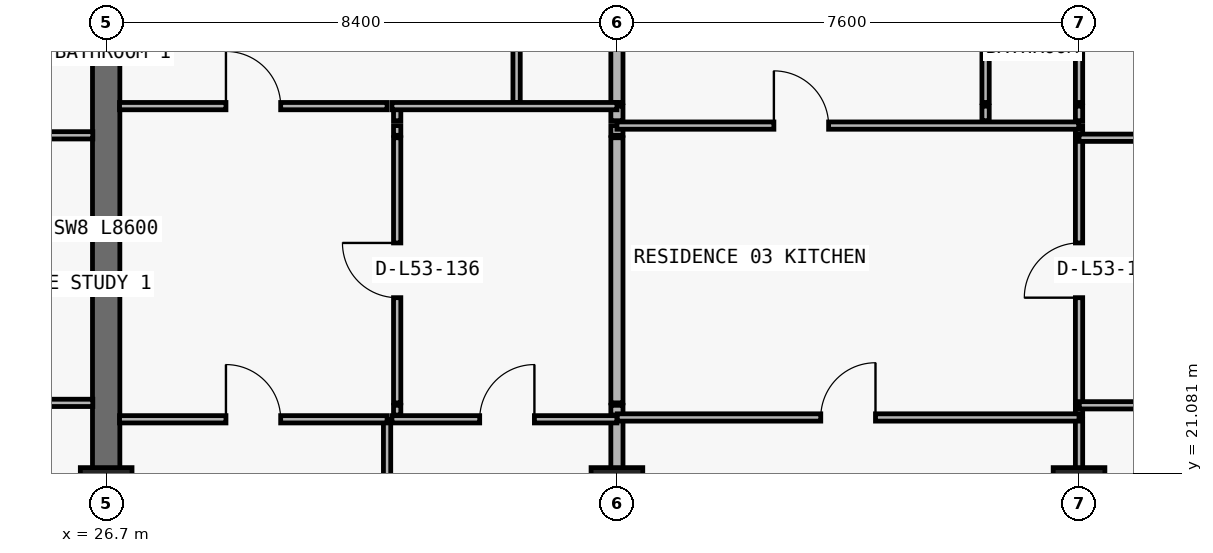
"""IFC4 building model, lengths in metres.
Left out: names, types, materials, properties, quantities, classifications, styles, units other than length and angle.
Written with IfcOpenShell. Run it as: python <this file> out.ifc"""

import sys

from ifc_helpers import new_model, si_unit, direction, frame, frame_2d, origin, origin_2d, place, context, subcontext, project, spatial, rectangle, extrude, element, fill, save


model = new_model("IFC4")
c1 = context("Model", 3, precision=1e-05, world=origin(), true_north=direction((0.0, 1.0)))
c2 = subcontext(c1, "Body", "Model", "MODEL_VIEW")
j1 = project(units=[si_unit("LENGTHUNIT", "METRE"), si_unit("PLANEANGLEUNIT", "RADIAN")], contexts=[c1])
p1 = place(None, origin())
s1 = spatial("IfcSite", under=j1, at=p1, CompositionType="ELEMENT")
p2 = place(p1, origin())
s2 = spatial("IfcBuilding", under=s1, at=p2, CompositionType="ELEMENT")
p3 = place(p2, frame((0.0, 0.0, 191.7)))
s3 = spatial("IfcBuildingStorey", under=s2, at=p3, CompositionType="ELEMENT", Elevation=191.7)
for number, where, z_axis, x_axis in (
    (1, (26.7, 20.8, 0.0), (0.0, 0.0, 1.0), (1.0, 0.0, 0.0)),
    (2, (35.1, 20.8, 0.0), (0.0, 0.0, 1.0), (1.0, 0.0, 0.0)),
    (3, (42.7, 20.8, 0.0), (0.0, 0.0, 1.0), (1.0, 0.0, 0.0)),
):
    element("IfcColumn", number, at=place(p3, frame(where, z_axis=z_axis, x_axis=x_axis)), inside=s3, PredefinedType="COLUMN", context=c2, shape_type="SweptSolid", body=[
        extrude(rectangle(XDim=0.85, YDim=0.75, at=origin_2d()), origin(), (0.0, 0.0, 1.0), 3.05),
    ])
p4 = place(p3, frame((26.7, 20.8, 0.0), z_axis=(0.0, 0.0, 1.0), x_axis=(0.0, 1.0, 0.0)))
e4 = element("IfcWall", 4, at=p4, inside=s3, PredefinedType="SHEAR", context=c2, shape_type="SweptSolid", body=[
    extrude(rectangle(XDim=8.6, YDim=0.45, at=frame_2d((4.3, 0.0))), origin(), (0.0, 0.0, 1.0), 3.05),
])
p5 = place(p3, frame((31.32, 11.24, 0.0), z_axis=(0.0, 0.0, 1.0), x_axis=(0.0, 1.0, 0.0)))
e5 = element("IfcWall", 5, at=p5, inside=s3, PredefinedType="PARTITIONING", context=c2, shape_type="SweptSolid", body=[
    extrude(rectangle(XDim=10.73, YDim=0.12, at=frame_2d((5.365, 0.0))), origin(), (0.0, 0.0, 1.0), 3.05),
])
p6 = place(p3, frame((31.486, 22.04, 0.0), z_axis=(0.0, 0.0, 1.0), x_axis=(0.0, 1.0, 0.0)))
e6 = element("IfcWall", 6, at=p6, inside=s3, PredefinedType="PARTITIONING", context=c2, shape_type="SweptSolid", body=[
    extrude(rectangle(XDim=0.16, YDim=0.12, at=frame_2d((0.08, 0.0))), origin(), (0.0, 0.0, 1.0), 3.05),
])
p7 = place(p3, frame((31.486, 22.24, 0.0), z_axis=(0.0, 0.0, 1.0), x_axis=(0.0, 1.0, 0.0)))
e7 = element("IfcWall", 7, at=p7, inside=s3, PredefinedType="PARTITIONING", context=c2, shape_type="SweptSolid", body=[
    extrude(rectangle(XDim=4.36, YDim=0.12, at=frame_2d((2.18, 0.0))), origin(), (0.0, 0.0, 1.0), 3.05),
])
p8 = place(p7, frame((1.73, 0.0, 0.0)))
e8 = element("IfcOpeningElement", 8, at=p8, cuts=e7, PredefinedType="OPENING", context=c2, shape_type="SweptSolid", body=[
    extrude(rectangle(XDim=0.9, YDim=2.15, at=frame_2d((0.45, 1.075))), frame((0.0, 0.07, 0.0), z_axis=(0.0, -1.0, 0.0), x_axis=(1.0, 0.0, 0.0)), (0.0, 0.0, 1.0), 0.14),
])
p9 = place(p3, frame((31.486, 26.64, 0.0), z_axis=(0.0, 0.0, 1.0), x_axis=(0.0, 1.0, 0.0)))
e9 = element("IfcWall", 9, at=p9, inside=s3, PredefinedType="PARTITIONING", context=c2, shape_type="SweptSolid", body=[
    extrude(rectangle(XDim=0.16, YDim=0.12, at=frame_2d((0.08, 0.0))), origin(), (0.0, 0.0, 1.0), 3.05),
])
p10 = place(p3, frame((31.486, 26.88, 0.0), z_axis=(0.0, 0.0, 1.0), x_axis=(0.0, 1.0, 0.0)))
e10 = element("IfcWall", 10, at=p10, inside=s3, PredefinedType="PARTITIONING", context=c2, shape_type="SweptSolid", body=[
    extrude(rectangle(XDim=0.24, YDim=0.12, at=frame_2d((0.12, 0.0))), origin(), (0.0, 0.0, 1.0), 3.05),
])
p11 = place(p3, frame((33.45, 27.18, 0.0), z_axis=(0.0, 0.0, 1.0), x_axis=(0.0, 1.0, 0.0)))
e11 = element("IfcWall", 11, at=p11, inside=s3, PredefinedType="PARTITIONING", context=c2, shape_type="SweptSolid", body=[
    extrude(rectangle(XDim=6.32, YDim=0.12, at=frame_2d((3.16, 0.0))), origin(), (0.0, 0.0, 1.0), 3.05),
])
p12 = place(p11, frame((3.035, 0.0, 0.0)))
e12 = element("IfcOpeningElement", 12, at=p12, cuts=e11, PredefinedType="OPENING", context=c2, shape_type="SweptSolid", body=[
    extrude(rectangle(XDim=0.85, YDim=2.1, at=frame_2d((0.425, 1.05))), frame((0.0, 0.07, 0.0), z_axis=(0.0, -1.0, 0.0), x_axis=(1.0, 0.0, 0.0)), (0.0, 0.0, 1.0), 0.14),
])
p13 = place(p3, frame((35.1, 11.24, 0.0), z_axis=(0.0, 0.0, 1.0), x_axis=(0.0, 1.0, 0.0)))
e13 = element("IfcWall", 13, at=p13, inside=s3, PredefinedType="PARTITIONING", context=c2, shape_type="SweptSolid", body=[
    extrude(rectangle(XDim=10.73, YDim=0.2, at=frame_2d((5.365, 0.0))), origin(), (0.0, 0.0, 1.0), 2.263),
])
p14 = place(p3, frame((35.1, 22.04, 0.0), z_axis=(0.0, 0.0, 1.0), x_axis=(0.0, 1.0, 0.0)))
e14 = element("IfcWall", 14, at=p14, inside=s3, PredefinedType="PARTITIONING", context=c2, shape_type="SweptSolid", body=[
    extrude(rectangle(XDim=0.16, YDim=0.2, at=frame_2d((0.08, 0.0))), origin(), (0.0, 0.0, 1.0), 2.263),
])
p15 = place(p3, frame((35.1, 22.24, 0.0), z_axis=(0.0, 0.0, 1.0), x_axis=(0.0, 1.0, 0.0)))
e15 = element("IfcWall", 15, at=p15, inside=s3, PredefinedType="PARTITIONING", context=c2, shape_type="SweptSolid", body=[
    extrude(rectangle(XDim=4.36, YDim=0.2, at=frame_2d((2.18, 0.0))), origin(), (0.0, 0.0, 1.0), 2.263),
])
p16 = place(p3, frame((35.1, 26.64, 0.0), z_axis=(0.0, 0.0, 1.0), x_axis=(0.0, 1.0, 0.0)))
e16 = element("IfcWall", 16, at=p16, inside=s3, PredefinedType="PARTITIONING", context=c2, shape_type="SweptSolid", body=[
    extrude(rectangle(XDim=0.16, YDim=0.2, at=frame_2d((0.08, 0.0))), origin(), (0.0, 0.0, 1.0), 2.263),
])
p17 = place(p3, frame((35.1, 26.88, 0.0), z_axis=(0.0, 0.0, 1.0), x_axis=(0.0, 1.0, 0.0)))
e17 = element("IfcWall", 17, at=p17, inside=s3, PredefinedType="PARTITIONING", context=c2, shape_type="SweptSolid", body=[
    extrude(rectangle(XDim=0.24, YDim=0.2, at=frame_2d((0.12, 0.0))), origin(), (0.0, 0.0, 1.0), 2.263),
])
p18 = place(p3, frame((35.1, 27.18, 0.0), z_axis=(0.0, 0.0, 1.0), x_axis=(0.0, 1.0, 0.0)))
e18 = element("IfcWall", 18, at=p18, inside=s3, PredefinedType="PARTITIONING", context=c2, shape_type="SweptSolid", body=[
    extrude(rectangle(XDim=6.32, YDim=0.2, at=frame_2d((3.16, 0.0))), origin(), (0.0, 0.0, 1.0), 2.263),
])
p19 = place(p3, frame((41.163, 26.88, 0.0), z_axis=(0.0, 0.0, 1.0), x_axis=(0.0, 1.0, 0.0)))
e19 = element("IfcWall", 19, at=p19, inside=s3, PredefinedType="PARTITIONING", context=c2, shape_type="SweptSolid", body=[
    extrude(rectangle(XDim=0.24, YDim=0.12, at=frame_2d((0.12, 0.0))), origin(), (0.0, 0.0, 1.0), 3.05),
])
p20 = place(p3, frame((41.163, 27.18, 0.0), z_axis=(0.0, 0.0, 1.0), x_axis=(0.0, 1.0, 0.0)))
e20 = element("IfcWall", 20, at=p20, inside=s3, PredefinedType="PARTITIONING", context=c2, shape_type="SweptSolid", body=[
    extrude(rectangle(XDim=6.32, YDim=0.12, at=frame_2d((3.16, 0.0))), origin(), (0.0, 0.0, 1.0), 3.05),
])
p21 = place(p20, frame((3.035, 0.0, 0.0)))
e21 = element("IfcOpeningElement", 21, at=p21, cuts=e20, PredefinedType="OPENING", context=c2, shape_type="SweptSolid", body=[
    extrude(rectangle(XDim=0.85, YDim=2.1, at=frame_2d((0.425, 1.05))), frame((0.0, 0.07, 0.0), z_axis=(0.0, -1.0, 0.0), x_axis=(1.0, 0.0, 0.0)), (0.0, 0.0, 1.0), 0.14),
])
p22 = place(p3, frame((42.7, 11.24, 0.0), z_axis=(0.0, 0.0, 1.0), x_axis=(0.0, 1.0, 0.0)))
e22 = element("IfcWall", 22, at=p22, inside=s3, PredefinedType="PARTITIONING", context=c2, shape_type="SweptSolid", body=[
    extrude(rectangle(XDim=10.73, YDim=0.12, at=frame_2d((5.365, 0.0))), origin(), (0.0, 0.0, 1.0), 2.263),
])
p23 = place(p3, frame((42.7, 22.04, 0.0), z_axis=(0.0, 0.0, 1.0), x_axis=(0.0, 1.0, 0.0)))
e23 = element("IfcWall", 23, at=p23, inside=s3, PredefinedType="PARTITIONING", context=c2, shape_type="SweptSolid", body=[
    extrude(rectangle(XDim=0.16, YDim=0.12, at=frame_2d((0.08, 0.0))), origin(), (0.0, 0.0, 1.0), 2.263),
])
p24 = place(p3, frame((42.7, 22.24, 0.0), z_axis=(0.0, 0.0, 1.0), x_axis=(0.0, 1.0, 0.0)))
e24 = element("IfcWall", 24, at=p24, inside=s3, PredefinedType="PARTITIONING", context=c2, shape_type="SweptSolid", body=[
    extrude(rectangle(XDim=4.36, YDim=0.12, at=frame_2d((2.18, 0.0))), origin(), (0.0, 0.0, 1.0), 2.263),
])
p25 = place(p24, frame((1.73, 0.0, 0.0)))
e25 = element("IfcOpeningElement", 25, at=p25, cuts=e24, PredefinedType="OPENING", context=c2, shape_type="SweptSolid", body=[
    extrude(rectangle(XDim=0.9, YDim=2.15, at=frame_2d((0.45, 1.075))), frame((0.0, 0.07, 0.0), z_axis=(0.0, -1.0, 0.0), x_axis=(1.0, 0.0, 0.0)), (0.0, 0.0, 1.0), 0.14),
])
p26 = place(p3, frame((42.7, 26.64, 0.0), z_axis=(0.0, 0.0, 1.0), x_axis=(0.0, 1.0, 0.0)))
e26 = element("IfcWall", 26, at=p26, inside=s3, PredefinedType="PARTITIONING", context=c2, shape_type="SweptSolid", body=[
    extrude(rectangle(XDim=0.16, YDim=0.12, at=frame_2d((0.08, 0.0))), origin(), (0.0, 0.0, 1.0), 2.263),
])
p27 = place(p3, frame((42.7, 26.88, 0.0), z_axis=(0.0, 0.0, 1.0), x_axis=(0.0, 1.0, 0.0)))
e27 = element("IfcWall", 27, at=p27, inside=s3, PredefinedType="PARTITIONING", context=c2, shape_type="SweptSolid", body=[
    extrude(rectangle(XDim=0.24, YDim=0.12, at=frame_2d((0.12, 0.0))), origin(), (0.0, 0.0, 1.0), 2.263),
])
p28 = place(p3, frame((42.7, 27.18, 0.0), z_axis=(0.0, 0.0, 1.0), x_axis=(0.0, 1.0, 0.0)))
e28 = element("IfcWall", 28, at=p28, inside=s3, PredefinedType="PARTITIONING", context=c2, shape_type="SweptSolid", body=[
    extrude(rectangle(XDim=6.32, YDim=0.12, at=frame_2d((3.16, 0.0))), origin(), (0.0, 0.0, 1.0), 2.263),
])
p29 = place(p3, frame((26.92, 21.97, 0.0), z_axis=(0.0, 0.0, 1.0), x_axis=(1.0, 0.0, 0.0)))
e29 = element("IfcWall", 29, at=p29, inside=s3, PredefinedType="PARTITIONING", context=c2, shape_type="SweptSolid", body=[
    extrude(rectangle(XDim=4.4, YDim=0.12, at=frame_2d((2.2, 0.0))), origin(), (0.0, 0.0, 1.0), 3.05),
])
p30 = place(p29, frame((1.75, 0.0, 0.0)))
e30 = element("IfcOpeningElement", 30, at=p30, cuts=e29, PredefinedType="OPENING", context=c2, shape_type="SweptSolid", body=[
    extrude(rectangle(XDim=0.9, YDim=2.15, at=frame_2d((0.45, 1.075))), frame((0.0, 0.07, 0.0), z_axis=(0.0, -1.0, 0.0), x_axis=(1.0, 0.0, 0.0)), (0.0, 0.0, 1.0), 0.14),
])
p31 = place(p3, frame((31.4, 21.97, 0.0), z_axis=(0.0, 0.0, 1.0), x_axis=(1.0, 0.0, 0.0)))
e31 = element("IfcWall", 31, at=p31, inside=s3, PredefinedType="PARTITIONING", context=c2, shape_type="SweptSolid", body=[
    extrude(rectangle(XDim=3.7, YDim=0.12, at=frame_2d((1.85, 0.0))), origin(), (0.0, 0.0, 1.0), 3.05),
])
p32 = place(p31, frame((1.443, 0.0, 0.0)))
e32 = element("IfcOpeningElement", 32, at=p32, cuts=e31, PredefinedType="OPENING", context=c2, shape_type="SweptSolid", body=[
    extrude(rectangle(XDim=0.9, YDim=2.15, at=frame_2d((0.45, 1.075))), frame((0.0, 0.07, 0.0), z_axis=(0.0, -1.0, 0.0), x_axis=(1.0, 0.0, 0.0)), (0.0, 0.0, 1.0), 0.14),
])
p33 = place(p3, frame((35.105, 22.0, 0.0), z_axis=(0.0, 0.0, 1.0), x_axis=(1.0, 0.0, 0.0)))
e33 = element("IfcWall", 33, at=p33, inside=s3, PredefinedType="PARTITIONING", context=c2, shape_type="SweptSolid", body=[
    extrude(rectangle(XDim=7.595, YDim=0.12, at=frame_2d((3.797, 0.0))), origin(), (0.0, 0.0, 1.0), 3.05),
])
p34 = place(p33, frame((3.347, 0.0, 0.0)))
e34 = element("IfcOpeningElement", 34, at=p34, cuts=e33, PredefinedType="OPENING", context=c2, shape_type="SweptSolid", body=[
    extrude(rectangle(XDim=0.9, YDim=2.15, at=frame_2d((0.45, 1.075))), frame((0.0, 0.07, 0.0), z_axis=(0.0, -1.0, 0.0), x_axis=(1.0, 0.0, 0.0)), (0.0, 0.0, 1.0), 0.14),
])
p35 = place(p3, frame((42.705, 22.2, 0.0), z_axis=(0.0, 0.0, 1.0), x_axis=(1.0, 0.0, 0.0)))
e35 = element("IfcWall", 35, at=p35, inside=s3, PredefinedType="PARTITIONING", context=c2, shape_type="SweptSolid", body=[
    extrude(rectangle(XDim=8.175, YDim=0.12, at=frame_2d((4.087, 0.0))), origin(), (0.0, 0.0, 1.0), 3.05),
])
p36 = place(p35, frame((3.637, 0.0, 0.0)))
e36 = element("IfcOpeningElement", 36, at=p36, cuts=e35, PredefinedType="OPENING", context=c2, shape_type="SweptSolid", body=[
    extrude(rectangle(XDim=0.9, YDim=2.15, at=frame_2d((0.45, 1.075))), frame((0.0, 0.07, 0.0), z_axis=(0.0, -1.0, 0.0), x_axis=(1.0, 0.0, 0.0)), (0.0, 0.0, 1.0), 0.14),
])
p37 = place(p3, frame((18.305, 22.24, 0.0), z_axis=(0.0, 0.0, 1.0), x_axis=(1.0, 0.0, 0.0)))
e37 = element("IfcWall", 37, at=p37, inside=s3, PredefinedType="PARTITIONING", context=c2, shape_type="SweptSolid", body=[
    extrude(rectangle(XDim=8.175, YDim=0.12, at=frame_2d((4.087, 0.0))), origin(), (0.0, 0.0, 1.0), 3.05),
])
p38 = place(p37, frame((3.637, 0.0, 0.0)))
e38 = element("IfcOpeningElement", 38, at=p38, cuts=e37, PredefinedType="OPENING", context=c2, shape_type="SweptSolid", body=[
    extrude(rectangle(XDim=0.9, YDim=2.15, at=frame_2d((0.45, 1.075))), frame((0.0, 0.07, 0.0), z_axis=(0.0, -1.0, 0.0), x_axis=(1.0, 0.0, 0.0)), (0.0, 0.0, 1.0), 0.14),
])
p39 = place(p3, frame((42.7, 26.6, 0.0), z_axis=(0.0, 0.0, 1.0), x_axis=(1.0, 0.0, 0.0)))
e39 = element("IfcWall", 39, at=p39, inside=s3, PredefinedType="PARTITIONING", context=c2, shape_type="SweptSolid", body=[
    extrude(rectangle(XDim=8.18, YDim=0.12, at=frame_2d((4.09, 0.0))), origin(), (0.0, 0.0, 1.0), 3.05),
])
p40 = place(p39, frame((3.0, 0.0, 0.0)))
e40 = element("IfcOpeningElement", 40, at=p40, cuts=e39, PredefinedType="OPENING", context=c2, shape_type="SweptSolid", body=[
    extrude(rectangle(XDim=0.9, YDim=2.15, at=frame_2d((0.45, 1.075))), frame((0.0, 0.07, 0.0), z_axis=(0.0, -1.0, 0.0), x_axis=(1.0, 0.0, 0.0)), (0.0, 0.0, 1.0), 0.14),
])
p41 = place(p3, frame((18.3, 26.64, 0.0), z_axis=(0.0, 0.0, 1.0), x_axis=(1.0, 0.0, 0.0)))
e41 = element("IfcWall", 41, at=p41, inside=s3, PredefinedType="PARTITIONING", context=c2, shape_type="SweptSolid", body=[
    extrude(rectangle(XDim=8.18, YDim=0.12, at=frame_2d((4.09, 0.0))), origin(), (0.0, 0.0, 1.0), 3.05),
])
p42 = place(p41, frame((3.0, 0.0, 0.0)))
e42 = element("IfcOpeningElement", 42, at=p42, cuts=e41, PredefinedType="OPENING", context=c2, shape_type="SweptSolid", body=[
    extrude(rectangle(XDim=0.9, YDim=2.15, at=frame_2d((0.45, 1.075))), frame((0.0, 0.07, 0.0), z_axis=(0.0, -1.0, 0.0), x_axis=(1.0, 0.0, 0.0)), (0.0, 0.0, 1.0), 0.14),
])
p43 = place(p3, frame((35.1, 26.8, 0.0), z_axis=(0.0, 0.0, 1.0), x_axis=(1.0, 0.0, 0.0)))
e43 = element("IfcWall", 43, at=p43, inside=s3, PredefinedType="PARTITIONING", context=c2, shape_type="SweptSolid", body=[
    extrude(rectangle(XDim=7.595, YDim=0.12, at=frame_2d((3.797, 0.0))), origin(), (0.0, 0.0, 1.0), 3.05),
])
p44 = place(p43, frame((2.582, 0.0, 0.0)))
e44 = element("IfcOpeningElement", 44, at=p44, cuts=e43, PredefinedType="OPENING", context=c2, shape_type="SweptSolid", body=[
    extrude(rectangle(XDim=0.9, YDim=2.15, at=frame_2d((0.45, 1.075))), frame((0.0, 0.07, 0.0), z_axis=(0.0, -1.0, 0.0), x_axis=(1.0, 0.0, 0.0)), (0.0, 0.0, 1.0), 0.14),
])
p45 = place(p3, frame((26.92, 27.12, 0.0), z_axis=(0.0, 0.0, 1.0), x_axis=(1.0, 0.0, 0.0)))
e45 = element("IfcWall", 45, at=p45, inside=s3, PredefinedType="PARTITIONING", context=c2, shape_type="SweptSolid", body=[
    extrude(rectangle(XDim=4.4, YDim=0.12, at=frame_2d((2.2, 0.0))), origin(), (0.0, 0.0, 1.0), 3.05),
])
p46 = place(p45, frame((1.75, 0.0, 0.0)))
e46 = element("IfcOpeningElement", 46, at=p46, cuts=e45, PredefinedType="OPENING", context=c2, shape_type="SweptSolid", body=[
    extrude(rectangle(XDim=0.9, YDim=2.15, at=frame_2d((0.45, 1.075))), frame((0.0, 0.07, 0.0), z_axis=(0.0, -1.0, 0.0), x_axis=(1.0, 0.0, 0.0)), (0.0, 0.0, 1.0), 0.14),
])
p47 = place(p3, frame((31.4, 27.12, 0.0), z_axis=(0.0, 0.0, 1.0), x_axis=(1.0, 0.0, 0.0)))
e47 = element("IfcWall", 47, at=p47, inside=s3, PredefinedType="PARTITIONING", context=c2, shape_type="SweptSolid", body=[
    extrude(rectangle(XDim=3.7, YDim=0.12, at=frame_2d((1.85, 0.0))), origin(), (0.0, 0.0, 1.0), 3.05),
])
p48 = place(p46, origin())
e48 = element("IfcDoor", 48, at=p48, inside=s3, OperationType="SINGLE_SWING_LEFT", PredefinedType="DOOR", context=c2, shape_type="SweptSolid", body=[
    extrude(rectangle(XDim=0.9, YDim=2.15, at=frame_2d((0.45, 1.075))), frame((0.0, 0.025, 0.0), z_axis=(0.0, -1.0, 0.0), x_axis=(1.0, 0.0, 0.0)), (0.0, 0.0, 1.0), 0.05),
])
fill(e46, e48)
p49 = place(p8, origin())
e49 = element("IfcDoor", 49, at=p49, inside=s3, OperationType="SINGLE_SWING_RIGHT", PredefinedType="DOOR", context=c2, shape_type="SweptSolid", body=[
    extrude(rectangle(XDim=0.9, YDim=2.15, at=frame_2d((0.45, 1.075))), frame((0.0, 0.025, 0.0), z_axis=(0.0, -1.0, 0.0), x_axis=(1.0, 0.0, 0.0)), (0.0, 0.0, 1.0), 0.05),
])
fill(e8, e49)
p50 = place(p30, origin())
e50 = element("IfcDoor", 50, at=p50, inside=s3, OperationType="SINGLE_SWING_LEFT", PredefinedType="DOOR", context=c2, shape_type="SweptSolid", body=[
    extrude(rectangle(XDim=0.9, YDim=2.15, at=frame_2d((0.45, 1.075))), frame((0.0, 0.025, 0.0), z_axis=(0.0, -1.0, 0.0), x_axis=(1.0, 0.0, 0.0)), (0.0, 0.0, 1.0), 0.05),
])
fill(e30, e50)
p51 = place(p32, origin())
e51 = element("IfcDoor", 51, at=p51, inside=s3, OperationType="SINGLE_SWING_RIGHT", PredefinedType="DOOR", context=c2, shape_type="SweptSolid", body=[
    extrude(rectangle(XDim=0.9, YDim=2.15, at=frame_2d((0.45, 1.075))), frame((0.0, 0.025, 0.0), z_axis=(0.0, -1.0, 0.0), x_axis=(1.0, 0.0, 0.0)), (0.0, 0.0, 1.0), 0.05),
])
fill(e32, e51)
p52 = place(p44, origin())
e52 = element("IfcDoor", 52, at=p52, inside=s3, OperationType="SINGLE_SWING_LEFT", PredefinedType="DOOR", context=c2, shape_type="SweptSolid", body=[
    extrude(rectangle(XDim=0.9, YDim=2.15, at=frame_2d((0.45, 1.075))), frame((0.0, 0.025, 0.0), z_axis=(0.0, -1.0, 0.0), x_axis=(1.0, 0.0, 0.0)), (0.0, 0.0, 1.0), 0.05),
])
fill(e44, e52)
p53 = place(p34, origin())
e53 = element("IfcDoor", 53, at=p53, inside=s3, OperationType="SINGLE_SWING_RIGHT", PredefinedType="DOOR", context=c2, shape_type="SweptSolid", body=[
    extrude(rectangle(XDim=0.9, YDim=2.15, at=frame_2d((0.45, 1.075))), frame((0.0, 0.025, 0.0), z_axis=(0.0, -1.0, 0.0), x_axis=(1.0, 0.0, 0.0)), (0.0, 0.0, 1.0), 0.05),
])
fill(e34, e53)
p54 = place(p25, origin())
e54 = element("IfcDoor", 54, at=p54, inside=s3, OperationType="SINGLE_SWING_LEFT", PredefinedType="DOOR", context=c2, shape_type="SweptSolid", body=[
    extrude(rectangle(XDim=0.9, YDim=2.15, at=frame_2d((0.45, 1.075))), frame((0.0, 0.025, 0.0), z_axis=(0.0, -1.0, 0.0), x_axis=(1.0, 0.0, 0.0)), (0.0, 0.0, 1.0), 0.05),
])
fill(e25, e54)
save(model, sys.argv[1])
